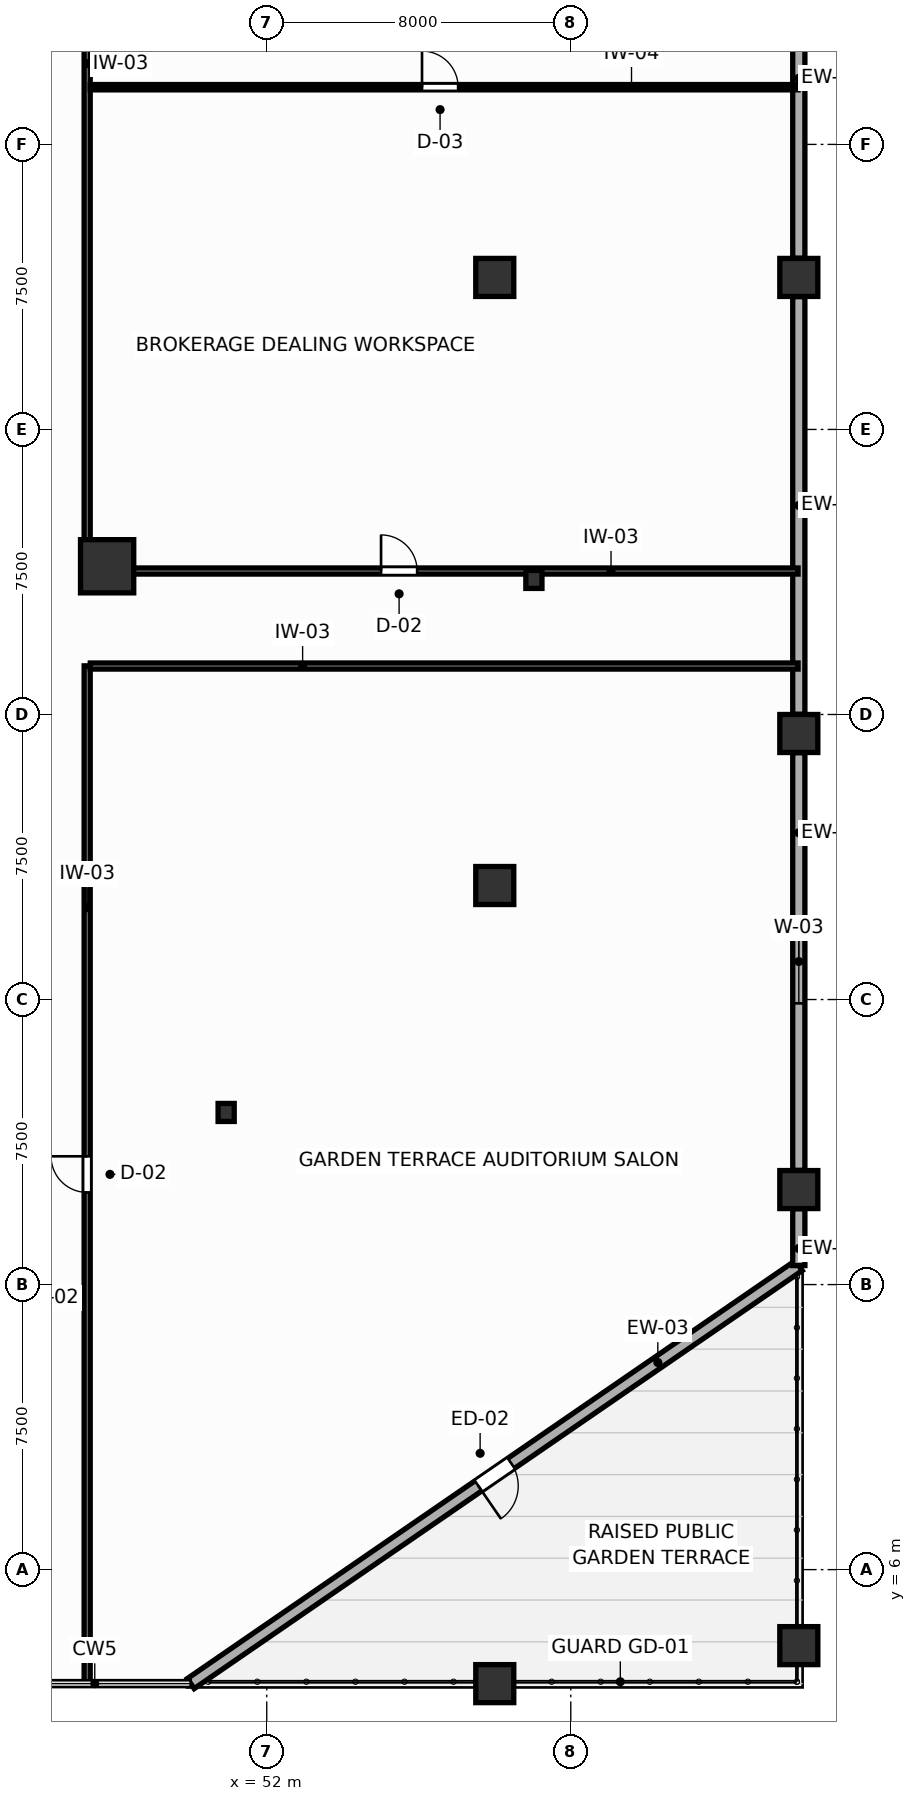
"""IFC4 building model, lengths in metres.
Left out: names, types, materials, properties, quantities, classifications, styles, units other than length and angle.
Written with IfcOpenShell. Run it as: python <this file> out.ifc"""

import sys

from ifc_helpers import new_model, si_unit, direction, frame, frame_2d, origin, origin_2d, place, context, subcontext, project, spatial, rectangle, i_section, extrude, source, transform, mapped, element, fill, save


model = new_model("IFC4")
c1 = context("Model", 3, precision=1e-05, world=origin(), true_north=direction((0.0, 1.0)))
c2 = subcontext(c1, "Body", "Model", "MODEL_VIEW")
j1 = project(units=[si_unit("LENGTHUNIT", "METRE"), si_unit("PLANEANGLEUNIT", "RADIAN")], contexts=[c1])
p1 = place(None, origin())
s1 = spatial("IfcSite", under=j1, at=p1, CompositionType="ELEMENT")
p2 = place(p1, origin())
s2 = spatial("IfcBuilding", under=s1, at=p2, CompositionType="ELEMENT")
p3 = place(p2, frame((0.0, 0.0, 19.2)))
s3 = spatial("IfcBuildingStorey", under=s2, at=p3, CompositionType="ELEMENT", Elevation=19.2)
m1 = source(origin(), c2, "Body", "SweptSolid", [
    extrude(rectangle(XDim=1.4, YDim=1.4, at=origin_2d()), origin(), (0.0, 0.0, 1.0), 4.8),
])
p4 = place(p3, frame((47.8, 32.4, 0.0), z_axis=(0.0, 0.0, 1.0), x_axis=(1.0, 0.0, 0.0)))
e1 = element("IfcColumn", 1, at=p4, inside=s3, PredefinedType="COLUMN", context=c2, shape_type="MappedRepresentation", body=[
    mapped(m1, transform((0.0, 0.0, 0.0), scale=1.0)),
])
m2 = source(origin(), c2, "Body", "SweptSolid", [
    extrude(rectangle(XDim=1.0, YDim=1.0, at=origin_2d()), origin(), (0.0, 0.0, 1.0), 4.8),
])
for number, where, z_axis, x_axis in (
    (2, (66.0, 4.0, 0.0), (0.0, 0.0, 1.0), (1.0, 0.0, 0.0)),
    (3, (66.0, 16.0, 0.0), (0.0, 0.0, 1.0), (1.0, 0.0, 0.0)),
    (4, (66.0, 28.0, 0.0), (0.0, 0.0, 1.0), (1.0, 0.0, 0.0)),
    (5, (66.0, 40.0, 0.0), (0.0, 0.0, 1.0), (1.0, 0.0, 0.0)),
    (6, (58.0, 3.0, 0.0), (0.0, 0.0, 1.0), (1.0, 0.0, 0.0)),
    (7, (58.0, 24.0, 0.0), (0.0, 0.0, 1.0), (1.0, 0.0, 0.0)),
    (8, (58.0, 40.0, 0.0), (0.0, 0.0, 1.0), (1.0, 0.0, 0.0)),
):
    element("IfcColumn", number, at=place(p3, frame(where, z_axis=z_axis, x_axis=x_axis)), inside=s3, PredefinedType="COLUMN", context=c2, shape_type="MappedRepresentation", body=[
        mapped(m2, transform((0.0, 0.0, 0.0), scale=1.0)),
    ])
m3 = source(origin(), c2, "Body", "SweptSolid", [
    extrude(i_section(OverallWidth=0.424, OverallDepth=0.474, WebThickness=0.045, FlangeThickness=0.072, FilletRadius=0.015, at=origin_2d()), origin(), (0.0, 0.0, 1.0), 4.8),
])
for number, where, z_axis, x_axis in (
    (9, (50.932, 18.029, 0.0), (0.0, 0.0, 1.0), (1.0, 0.0, 0.0)),
    (10, (59.03, 32.054, 0.0), (0.0, 0.0, 1.0), (1.0, 0.0, 0.0)),
):
    element("IfcColumn", number, at=place(p3, frame(where, z_axis=z_axis, x_axis=x_axis)), inside=s3, PredefinedType="COLUMN", context=c2, shape_type="MappedRepresentation", body=[
        mapped(m3, transform((0.0, 0.0, 0.0), scale=1.0)),
    ])
p5 = place(p3, frame((50.0, 3.0, 0.0), z_axis=(0.0, 0.0, 1.0), x_axis=(0.824041924199, 0.566528822887, 0.0)))
e11 = element("IfcWall", 11, at=p5, inside=s3, PredefinedType="SOLIDWALL", context=c2, shape_type="SweptSolid", body=[
    extrude(rectangle(XDim=19.417, YDim=0.32, at=frame_2d((9.708, 0.0))), origin(), (0.0, 0.0, 1.0), 4.58),
])
p6 = place(p5, frame((9.183, 0.0, 0.0)))
e12 = element("IfcOpeningElement", 12, at=p6, cuts=e11, PredefinedType="OPENING", context=c2, shape_type="SweptSolid", body=[
    extrude(rectangle(XDim=1.05, YDim=2.1, at=frame_2d((0.525, 1.05))), frame((0.0, 0.17, 0.0), z_axis=(0.0, -1.0, 0.0), x_axis=(1.0, 0.0, 0.0)), (0.0, 0.0, 1.0), 0.34),
])
p7 = place(p3, frame((66.0, 14.0, 0.0), z_axis=(0.0, 0.0, 1.0), x_axis=(0.0, 1.0, 0.0)))
e13 = element("IfcWall", 13, at=p7, inside=s3, PredefinedType="SOLIDWALL", context=c2, shape_type="SweptSolid", body=[
    extrude(rectangle(XDim=1.495, YDim=0.32, at=frame_2d((0.748, 0.0))), origin(), (0.0, 0.0, 1.0), 3.88),
])
p8 = place(p3, frame((66.0, 16.505, 0.0), z_axis=(0.0, 0.0, 1.0), x_axis=(0.0, 1.0, 0.0)))
e14 = element("IfcWall", 14, at=p8, inside=s3, PredefinedType="SOLIDWALL", context=c2, shape_type="SweptSolid", body=[
    extrude(rectangle(XDim=10.99, YDim=0.32, at=frame_2d((5.495, 0.0))), origin(), (0.0, 0.0, 1.0), 3.88),
])
p9 = place(p8, frame((4.395, 0.0, 0.75)))
e15 = element("IfcOpeningElement", 15, at=p9, cuts=e14, PredefinedType="OPENING", context=c2, shape_type="SweptSolid", body=[
    extrude(rectangle(XDim=2.2, YDim=2.0, at=frame_2d((1.1, 1.0))), frame((0.0, 0.17, 0.0), z_axis=(0.0, -1.0, 0.0), x_axis=(1.0, 0.0, 0.0)), (0.0, 0.0, 1.0), 0.34),
])
p10 = place(p3, frame((66.0, 28.505, 0.0), z_axis=(0.0, 0.0, 1.0), x_axis=(0.0, 1.0, 0.0)))
e16 = element("IfcWall", 16, at=p10, inside=s3, PredefinedType="SOLIDWALL", context=c2, shape_type="SweptSolid", body=[
    extrude(rectangle(XDim=10.99, YDim=0.32, at=frame_2d((5.495, 0.0))), origin(), (0.0, 0.0, 1.0), 3.88),
])
p11 = place(p3, frame((66.0, 40.505, 0.0), z_axis=(0.0, 0.0, 1.0), x_axis=(0.0, 1.0, 0.0)))
e17 = element("IfcWall", 17, at=p11, inside=s3, PredefinedType="SOLIDWALL", context=c2, shape_type="SweptSolid", body=[
    extrude(rectangle(XDim=9.47, YDim=0.32, at=frame_2d((4.735, 0.0))), origin(), (0.0, 0.0, 1.0), 3.88),
])
p12 = place(p3, frame((47.275, 3.02, 0.0), z_axis=(0.0, 0.0, 1.0), x_axis=(0.0, 1.0, 0.0)))
e18 = element("IfcWall", 18, at=p12, inside=s3, PredefinedType="PARTITIONING", context=c2, shape_type="SweptSolid", body=[
    extrude(rectangle(XDim=26.76, YDim=0.16, at=frame_2d((13.38, 0.0))), origin(), (0.0, 0.0, 1.0), 4.58),
])
p13 = place(p12, frame((12.905, 0.0, 0.0)))
e19 = element("IfcOpeningElement", 19, at=p13, cuts=e18, PredefinedType="OPENING", context=c2, shape_type="SweptSolid", body=[
    extrude(rectangle(XDim=0.95, YDim=2.05, at=frame_2d((0.475, 1.025))), frame((0.0, 0.09, 0.0), z_axis=(0.0, -1.0, 0.0), x_axis=(1.0, 0.0, 0.0)), (0.0, 0.0, 1.0), 0.18),
])
p14 = place(p3, frame((47.275, 32.27, 0.0), z_axis=(0.0, 0.0, 1.0), x_axis=(0.0, 1.0, 0.0)))
e20 = element("IfcWall", 20, at=p14, inside=s3, PredefinedType="PARTITIONING", context=c2, shape_type="SweptSolid", body=[
    extrude(rectangle(XDim=26.71, YDim=0.16, at=frame_2d((13.355, 0.0))), origin(), (0.0, 0.0, 1.0), 4.58),
])
p15 = place(p3, frame((47.357, 32.275, 0.0), z_axis=(0.0, 0.0, 1.0), x_axis=(1.0, 0.0, 0.0)))
e21 = element("IfcWall", 21, at=p15, inside=s3, PredefinedType="PARTITIONING", context=c2, shape_type="SweptSolid", body=[
    extrude(rectangle(XDim=18.623, YDim=0.16, at=frame_2d((9.312, 0.0))), origin(), (0.0, 0.0, 1.0), 3.88),
])
p16 = place(p15, frame((7.651, 0.0, 0.0)))
e22 = element("IfcOpeningElement", 22, at=p16, cuts=e21, PredefinedType="OPENING", context=c2, shape_type="SweptSolid", body=[
    extrude(rectangle(XDim=0.95, YDim=2.05, at=frame_2d((0.475, 1.025))), frame((0.0, 0.09, 0.0), z_axis=(0.0, -1.0, 0.0), x_axis=(1.0, 0.0, 0.0)), (0.0, 0.0, 1.0), 0.18),
])
p17 = place(p3, frame((47.357, 29.775, 0.0), z_axis=(0.0, 0.0, 1.0), x_axis=(1.0, 0.0, 0.0)))
e23 = element("IfcWall", 23, at=p17, inside=s3, PredefinedType="PARTITIONING", context=c2, shape_type="SweptSolid", body=[
    extrude(rectangle(XDim=18.623, YDim=0.16, at=frame_2d((9.312, 0.0))), origin(), (0.0, 0.0, 1.0), 4.58),
])
p18 = place(p3, frame((47.357, 45.005, 0.0), z_axis=(0.0, 0.0, 1.0), x_axis=(1.0, 0.0, 0.0)))
e24 = element("IfcWall", 24, at=p18, inside=s3, PredefinedType="PARTITIONING", context=c2, shape_type="SweptSolid", body=[
    extrude(rectangle(XDim=18.623, YDim=0.14, at=frame_2d((9.312, 0.0))), origin(), (0.0, 0.0, 1.0), 4.58),
])
p19 = place(p18, frame((8.729, 0.0, 0.0)))
e25 = element("IfcOpeningElement", 25, at=p19, cuts=e24, PredefinedType="OPENING", context=c2, shape_type="SweptSolid", body=[
    extrude(rectangle(XDim=0.95, YDim=2.05, at=frame_2d((0.475, 1.025))), frame((0.0, 0.08, 0.0), z_axis=(0.0, -1.0, 0.0), x_axis=(1.0, 0.0, 0.0)), (0.0, 0.0, 1.0), 0.16),
])
p20 = place(p6, frame((1.05, 0.0, 0.0), z_axis=(0.0, 0.0, 1.0), x_axis=(-1.0, 0.0, 0.0)))
e26 = element("IfcDoor", 26, at=p20, inside=s3, OperationType="SINGLE_SWING_RIGHT", PredefinedType="DOOR", context=c2, shape_type="SweptSolid", body=[
    extrude(rectangle(XDim=1.05, YDim=2.1, at=frame_2d((0.525, 1.05))), frame((0.0, 0.025, 0.0), z_axis=(0.0, -1.0, 0.0), x_axis=(1.0, 0.0, 0.0)), (0.0, 0.0, 1.0), 0.05),
])
fill(e12, e26)
p21 = place(p9, origin())
e27 = element("IfcWindow", 27, at=p21, inside=s3, PartitioningType="SINGLE_PANEL", PredefinedType="WINDOW", context=c2, shape_type="SweptSolid", body=[
    extrude(rectangle(XDim=2.2, YDim=2.0, at=frame_2d((1.1, 1.0))), frame((0.0, 0.03, 0.0), z_axis=(0.0, -1.0, 0.0), x_axis=(1.0, 0.0, 0.0)), (0.0, 0.0, 1.0), 0.06),
])
fill(e15, e27)
p22 = place(p13, origin())
e28 = element("IfcDoor", 28, at=p22, inside=s3, OperationType="SINGLE_SWING_RIGHT", PredefinedType="DOOR", context=c2, shape_type="SweptSolid", body=[
    extrude(rectangle(XDim=0.95, YDim=2.05, at=frame_2d((0.475, 1.025))), frame((0.0, 0.025, 0.0), z_axis=(0.0, -1.0, 0.0), x_axis=(1.0, 0.0, 0.0)), (0.0, 0.0, 1.0), 0.05),
])
fill(e19, e28)
p23 = place(p16, origin())
e29 = element("IfcDoor", 29, at=p23, inside=s3, OperationType="SINGLE_SWING_LEFT", PredefinedType="DOOR", context=c2, shape_type="SweptSolid", body=[
    extrude(rectangle(XDim=0.95, YDim=2.05, at=frame_2d((0.475, 1.025))), frame((0.0, 0.025, 0.0), z_axis=(0.0, -1.0, 0.0), x_axis=(1.0, 0.0, 0.0)), (0.0, 0.0, 1.0), 0.05),
])
fill(e22, e29)
p24 = place(p19, origin())
e30 = element("IfcDoor", 30, at=p24, inside=s3, OperationType="SINGLE_SWING_LEFT", PredefinedType="DOOR", context=c2, shape_type="SweptSolid", body=[
    extrude(rectangle(XDim=0.95, YDim=2.05, at=frame_2d((0.475, 1.025))), frame((0.0, 0.025, 0.0), z_axis=(0.0, -1.0, 0.0), x_axis=(1.0, 0.0, 0.0)), (0.0, 0.0, 1.0), 0.05),
])
fill(e25, e30)
save(model, sys.argv[1])
